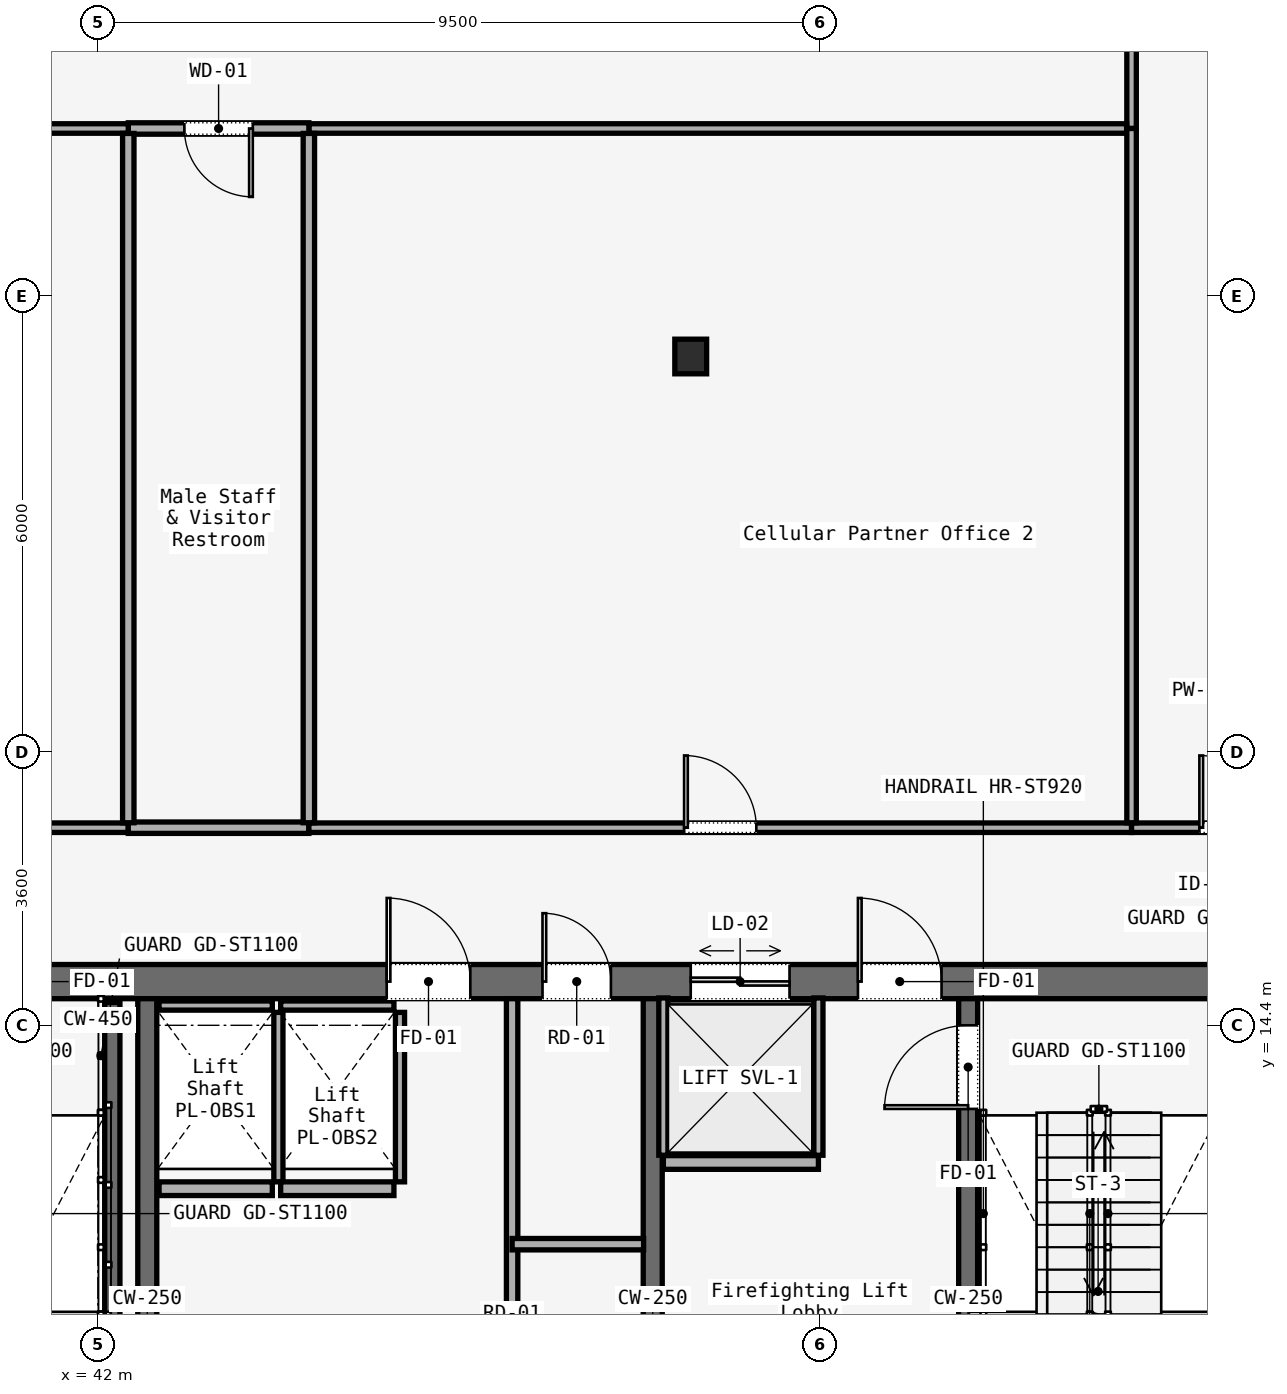
"""IFC4 building model, lengths in metres.
Left out: names, types, materials, properties, quantities, classifications, styles, units other than length and angle.
Written with IfcOpenShell. Run it as: python <this file> out.ifc"""

import sys

from ifc_helpers import new_model, si_unit, direction, frame, frame_2d, origin, origin_2d, place, context, subcontext, project, spatial, rectangle, i_section, extrude, element, fill, save


model = new_model("IFC4")
c1 = context("Model", 3, precision=1e-05, world=origin(), true_north=direction((0.0, 1.0)))
c2 = subcontext(c1, "Body", "Model", "MODEL_VIEW")
j1 = project(units=[si_unit("LENGTHUNIT", "METRE"), si_unit("PLANEANGLEUNIT", "RADIAN")], contexts=[c1])
p1 = place(None, origin())
s1 = spatial("IfcSite", under=j1, at=p1, CompositionType="ELEMENT")
p2 = place(p1, origin())
s2 = spatial("IfcBuilding", under=s1, at=p2, CompositionType="ELEMENT")
p3 = place(p2, frame((0.0, 0.0, 104.4)))
s3 = spatial("IfcBuildingStorey", under=s2, at=p3, CompositionType="ELEMENT", Elevation=104.4)
p4 = place(p3, frame((26.45, 14.975, 0.0), z_axis=(0.0, 0.0, 1.0), x_axis=(1.0, 0.0, 0.0)))
e1 = element("IfcWall", 1, at=p4, inside=s3, PredefinedType="SOLIDWALL", context=c2, shape_type="SweptSolid", body=[
    extrude(rectangle(XDim=31.1, YDim=0.45, at=frame_2d((15.55, 0.0))), origin(), (0.0, 0.0, 1.0), 3.58),
])
p5 = place(p4, frame((1.65, 0.0, 0.0)))
e2 = element("IfcOpeningElement", 2, at=p5, cuts=e1, PredefinedType="OPENING", context=c2, shape_type="SweptSolid", body=[
    extrude(rectangle(XDim=1.1, YDim=2.2, at=frame_2d((0.55, 1.1))), frame((0.0, 0.225, 0.0), z_axis=(0.0, -1.0, 0.0), x_axis=(1.0, 0.0, 0.0)), (0.0, 0.0, 1.0), 0.45),
])
p6 = place(p4, frame((13.65, 0.0, 0.0)))
e3 = element("IfcOpeningElement", 3, at=p6, cuts=e1, PredefinedType="OPENING", context=c2, shape_type="SweptSolid", body=[
    extrude(rectangle(XDim=1.1, YDim=2.2, at=frame_2d((0.55, 1.1))), frame((0.0, 0.225, 0.0), z_axis=(0.0, -1.0, 0.0), x_axis=(1.0, 0.0, 0.0)), (0.0, 0.0, 1.0), 0.45),
])
p7 = place(p4, frame((25.55, 0.0, 0.0)))
e4 = element("IfcOpeningElement", 4, at=p7, cuts=e1, PredefinedType="OPENING", context=c2, shape_type="SweptSolid", body=[
    extrude(rectangle(XDim=1.1, YDim=2.2, at=frame_2d((0.55, 1.1))), frame((0.0, 0.225, 0.0), z_axis=(0.0, -1.0, 0.0), x_axis=(1.0, 0.0, 0.0)), (0.0, 0.0, 1.0), 0.45),
])
p8 = place(p4, frame((10.7, 0.0, 0.0)))
e5 = element("IfcOpeningElement", 5, at=p8, cuts=e1, PredefinedType="OPENING", context=c2, shape_type="SweptSolid", body=[
    extrude(rectangle(XDim=1.4, YDim=2.2, at=frame_2d((0.7, 1.1))), frame((0.0, 0.225, 0.0), z_axis=(0.0, -1.0, 0.0), x_axis=(1.0, 0.0, 0.0)), (0.0, 0.0, 1.0), 0.45),
])
p9 = place(p4, frame((19.35, 0.0, 0.0)))
e6 = element("IfcOpeningElement", 6, at=p9, cuts=e1, PredefinedType="OPENING", context=c2, shape_type="SweptSolid", body=[
    extrude(rectangle(XDim=1.1, YDim=2.2, at=frame_2d((0.55, 1.1))), frame((0.0, 0.225, 0.0), z_axis=(0.0, -1.0, 0.0), x_axis=(1.0, 0.0, 0.0)), (0.0, 0.0, 1.0), 0.45),
])
p10 = place(p4, frame((21.4, 0.0, 0.0)))
e7 = element("IfcOpeningElement", 7, at=p10, cuts=e1, PredefinedType="OPENING", context=c2, shape_type="SweptSolid", body=[
    extrude(rectangle(XDim=0.9, YDim=2.1, at=frame_2d((0.45, 1.05))), frame((0.0, 0.225, 0.0), z_axis=(0.0, -1.0, 0.0), x_axis=(1.0, 0.0, 0.0)), (0.0, 0.0, 1.0), 0.45),
])
p11 = place(p4, frame((23.35, 0.0, 0.0)))
e8 = element("IfcOpeningElement", 8, at=p11, cuts=e1, PredefinedType="OPENING", context=c2, shape_type="SweptSolid", body=[
    extrude(rectangle(XDim=1.3, YDim=2.3, at=frame_2d((0.65, 1.15))), frame((0.0, 0.225, 0.0), z_axis=(0.0, -1.0, 0.0), x_axis=(1.0, 0.0, 0.0)), (0.0, 0.0, 1.0), 0.45),
])
for number, where, z_axis, x_axis in (
    (9, (42.65, 5.85, 0.0), (0.0, 0.0, 1.0), (0.0, 1.0, 0.0)),
    (10, (49.3, 5.85, 0.0), (0.0, 0.0, 1.0), (0.0, 1.0, 0.0)),
):
    element("IfcWall", number, at=place(p3, frame(where, z_axis=z_axis, x_axis=x_axis)), inside=s3, PredefinedType="SOLIDWALL", context=c2, shape_type="SweptSolid", body=[
        extrude(rectangle(XDim=8.9, YDim=0.25, at=frame_2d((4.45, 0.0))), origin(), (0.0, 0.0, 1.0), 3.58),
    ])
p12 = place(p3, frame((53.45, 5.85, 0.0), z_axis=(0.0, 0.0, 1.0), x_axis=(0.0, 1.0, 0.0)))
e11 = element("IfcWall", 11, at=p12, inside=s3, PredefinedType="SOLIDWALL", context=c2, shape_type="SweptSolid", body=[
    extrude(rectangle(XDim=8.9, YDim=0.25, at=frame_2d((4.45, 0.0))), origin(), (0.0, 0.0, 1.0), 3.58),
])
p13 = place(p12, frame((7.45, 0.0, 0.0)))
e12 = element("IfcOpeningElement", 12, at=p13, cuts=e11, PredefinedType="OPENING", context=c2, shape_type="SweptSolid", body=[
    extrude(rectangle(XDim=1.1, YDim=2.2, at=frame_2d((0.55, 1.1))), frame((0.0, 0.125, 0.0), z_axis=(0.0, -1.0, 0.0), x_axis=(1.0, 0.0, 0.0)), (0.0, 0.0, 1.0), 0.25),
])
p14 = place(p3, frame((49.8, 23.2, 0.0), z_axis=(0.0, 0.0, 1.0), x_axis=(1.0, 0.0, 0.0)))
e13 = element("IfcColumn", 13, at=p14, inside=s3, PredefinedType="COLUMN", context=c2, shape_type="SweptSolid", body=[
    extrude(i_section(OverallWidth=0.418, OverallDepth=0.456, WebThickness=0.042, FlangeThickness=0.067, FilletRadius=0.015, at=origin_2d()), origin(), (0.0, 0.0, 1.0), 3.58),
])
p15 = place(p3, frame((42.19, 14.7, 0.0), z_axis=(0.0, 0.0, 1.0), x_axis=(0.0, -1.0, 0.0)))
e14 = element("IfcWall", 14, at=p15, inside=s3, PredefinedType="SOLIDWALL", context=c2, shape_type="SweptSolid", body=[
    extrude(rectangle(XDim=7.65, YDim=0.2, at=frame_2d((3.825, 0.0))), origin(), (0.0, 0.0, 1.0), 3.8),
])
p16 = place(p3, frame((47.45, 5.9, 0.0), z_axis=(0.0, 0.0, 1.0), x_axis=(0.0, 1.0, 0.0)))
e15 = element("IfcWall", 15, at=p16, inside=s3, PredefinedType="PARTITIONING", context=c2, shape_type="SweptSolid", body=[
    extrude(rectangle(XDim=8.85, YDim=0.15, at=frame_2d((4.425, 0.0))), origin(), (0.0, 0.0, 1.0), 2.95),
])
p17 = place(p16, frame((3.2, 0.0, 0.0)))
e16 = element("IfcOpeningElement", 16, at=p17, cuts=e15, PredefinedType="OPENING", context=c2, shape_type="SweptSolid", body=[
    extrude(rectangle(XDim=0.9, YDim=2.1, at=frame_2d((0.45, 1.05))), frame((0.0, 0.075, 0.0), z_axis=(0.0, -1.0, 0.0), x_axis=(1.0, 0.0, 0.0)), (0.0, 0.0, 1.0), 0.15),
])
p18 = place(p3, frame((47.45, 11.52, 0.0), z_axis=(0.0, 0.0, 1.0), x_axis=(1.0, 0.0, 0.0)))
e17 = element("IfcWall", 17, at=p18, inside=s3, PredefinedType="PARTITIONING", context=c2, shape_type="SweptSolid", body=[
    extrude(rectangle(XDim=1.73, YDim=0.15, at=frame_2d((0.865, 0.0))), origin(), (0.0, 0.0, 1.0), 2.95),
])
p19 = place(p3, frame((42.805, 12.25, 0.0), z_axis=(0.0, 0.0, 1.0), x_axis=(1.0, 0.0, 0.0)))
e18 = element("IfcWall", 18, at=p19, inside=s3, PredefinedType="SOLIDWALL", context=c2, shape_type="SweptSolid", body=[
    extrude(rectangle(XDim=1.49, YDim=0.18, at=frame_2d((0.745, 0.0))), origin(), (0.0, 0.0, 1.0), 2.95),
])
p20 = place(p3, frame((42.805, 14.66, 0.0), z_axis=(0.0, 0.0, 1.0), x_axis=(1.0, 0.0, 0.0)))
e19 = element("IfcWall", 19, at=p20, inside=s3, PredefinedType="SOLIDWALL", context=c2, shape_type="SweptSolid", body=[
    extrude(rectangle(XDim=1.49, YDim=0.12, at=frame_2d((0.745, 0.0))), origin(), (0.0, 0.0, 1.0), 2.95),
])
p21 = place(p3, frame((44.375, 12.34, 0.0), z_axis=(0.0, 0.0, 1.0), x_axis=(0.0, 1.0, 0.0)))
e20 = element("IfcWall", 20, at=p21, inside=s3, PredefinedType="SOLIDWALL", context=c2, shape_type="SweptSolid", body=[
    extrude(rectangle(XDim=2.23, YDim=0.12, at=frame_2d((1.115, 0.0))), origin(), (0.0, 0.0, 1.0), 2.95),
])
p22 = place(p3, frame((44.405, 12.25, 0.0), z_axis=(0.0, 0.0, 1.0), x_axis=(1.0, 0.0, 0.0)))
e21 = element("IfcWall", 21, at=p22, inside=s3, PredefinedType="SOLIDWALL", context=c2, shape_type="SweptSolid", body=[
    extrude(rectangle(XDim=1.49, YDim=0.18, at=frame_2d((0.745, 0.0))), origin(), (0.0, 0.0, 1.0), 2.95),
])
p23 = place(p3, frame((44.405, 14.66, 0.0), z_axis=(0.0, 0.0, 1.0), x_axis=(1.0, 0.0, 0.0)))
e22 = element("IfcWall", 22, at=p23, inside=s3, PredefinedType="SOLIDWALL", context=c2, shape_type="SweptSolid", body=[
    extrude(rectangle(XDim=1.49, YDim=0.12, at=frame_2d((0.745, 0.0))), origin(), (0.0, 0.0, 1.0), 2.95),
])
p24 = place(p3, frame((45.975, 12.34, 0.0), z_axis=(0.0, 0.0, 1.0), x_axis=(0.0, 1.0, 0.0)))
e23 = element("IfcWall", 23, at=p24, inside=s3, PredefinedType="SOLIDWALL", context=c2, shape_type="SweptSolid", body=[
    extrude(rectangle(XDim=2.23, YDim=0.12, at=frame_2d((1.115, 0.0))), origin(), (0.0, 0.0, 1.0), 2.95),
])
p25 = place(p3, frame((49.44, 12.595, 0.0), z_axis=(0.0, 0.0, 1.0), x_axis=(1.0, 0.0, 0.0)))
e24 = element("IfcWall", 24, at=p25, inside=s3, PredefinedType="SOLIDWALL", context=c2, shape_type="SweptSolid", body=[
    extrude(rectangle(XDim=2.04, YDim=0.18, at=frame_2d((1.02, 0.0))), origin(), (0.0, 0.0, 1.0), 2.95),
])
for number, where, z_axis, x_axis in (
    (25, (49.44, 12.69, 0.0), (0.0, 0.0, 1.0), (0.0, 1.0, 0.0)),
    (26, (51.48, 12.69, 0.0), (0.0, 0.0, 1.0), (0.0, 1.0, 0.0)),
):
    element("IfcWall", number, at=place(p3, frame(where, z_axis=z_axis, x_axis=x_axis)), inside=s3, PredefinedType="SOLIDWALL", context=c2, shape_type="SweptSolid", body=[
        extrude(rectangle(XDim=2.07, YDim=0.12, at=frame_2d((1.035, 0.0))), origin(), (0.0, 0.0, 1.0), 2.95),
    ])
p26 = place(p3, frame((55.6, 27.935, 0.0), z_axis=(0.0, 0.0, 1.0), x_axis=(0.0, -1.0, 0.0)))
e27 = element("IfcWall", 27, at=p26, inside=s3, PredefinedType="PARTITIONING", context=c2, shape_type="SweptSolid", body=[
    extrude(rectangle(XDim=1.735, YDim=0.125, at=frame_2d((0.868, 0.0))), origin(), (0.0, 0.0, 1.0), 2.95),
])
p27 = place(p3, frame((55.535, 26.2, 0.0), z_axis=(0.0, 0.0, 1.0), x_axis=(-1.0, 0.0, 0.0)))
e28 = element("IfcWall", 28, at=p27, inside=s3, PredefinedType="PARTITIONING", context=c2, shape_type="SweptSolid", body=[
    extrude(rectangle(XDim=10.759, YDim=0.125, at=frame_2d((5.379, 0.0))), origin(), (0.0, 0.0, 1.0), 2.95),
])
p28 = place(p3, frame((44.776, 26.2, 0.0), z_axis=(0.0, 0.0, 1.0), x_axis=(-1.0, 0.0, 0.0)))
e29 = element("IfcWall", 29, at=p28, inside=s3, PredefinedType="PARTITIONING", context=c2, shape_type="SweptSolid", body=[
    extrude(rectangle(XDim=2.376, YDim=0.15, at=frame_2d((1.188, 0.0))), origin(), (0.0, 0.0, 1.0), 2.95),
])
p29 = place(p28, frame((0.738, 0.0, 0.0)))
e30 = element("IfcOpeningElement", 30, at=p29, cuts=e29, PredefinedType="OPENING", context=c2, shape_type="SweptSolid", body=[
    extrude(rectangle(XDim=0.9, YDim=2.15, at=frame_2d((0.45, 1.075))), frame((0.0, 0.075, 0.0), z_axis=(0.0, -1.0, 0.0), x_axis=(1.0, 0.0, 0.0)), (0.0, 0.0, 1.0), 0.15),
])
p30 = place(p3, frame((42.4, 26.2, 0.0), z_axis=(0.0, 0.0, 1.0), x_axis=(-1.0, 0.0, 0.0)))
e31 = element("IfcWall", 31, at=p30, inside=s3, PredefinedType="PARTITIONING", context=c2, shape_type="SweptSolid", body=[
    extrude(rectangle(XDim=10.8, YDim=0.125, at=frame_2d((5.4, 0.0))), origin(), (0.0, 0.0, 1.0), 2.95),
])
p31 = place(p30, frame((4.925, 0.0, 0.0)))
e32 = element("IfcOpeningElement", 32, at=p31, cuts=e31, PredefinedType="OPENING", context=c2, shape_type="SweptSolid", body=[
    extrude(rectangle(XDim=0.95, YDim=2.2, at=frame_2d((0.475, 1.1))), frame((0.0, 0.062, 0.0), z_axis=(0.0, -1.0, 0.0), x_axis=(1.0, 0.0, 0.0)), (0.0, 0.0, 1.0), 0.125),
])
p32 = place(p3, frame((31.665, 17.0, 0.0), z_axis=(0.0, 0.0, 1.0), x_axis=(1.0, 0.0, 0.0)))
e33 = element("IfcWall", 33, at=p32, inside=s3, PredefinedType="PARTITIONING", context=c2, shape_type="SweptSolid", body=[
    extrude(rectangle(XDim=10.735, YDim=0.125, at=frame_2d((5.367, 0.0))), origin(), (0.0, 0.0, 1.0), 2.95),
])
p33 = place(p3, frame((42.4, 17.0, 0.0), z_axis=(0.0, 0.0, 1.0), x_axis=(1.0, 0.0, 0.0)))
e34 = element("IfcWall", 34, at=p33, inside=s3, PredefinedType="PARTITIONING", context=c2, shape_type="SweptSolid", body=[
    extrude(rectangle(XDim=2.376, YDim=0.15, at=frame_2d((1.188, 0.0))), origin(), (0.0, 0.0, 1.0), 2.95),
])
p34 = place(p3, frame((44.776, 17.0, 0.0), z_axis=(0.0, 0.0, 1.0), x_axis=(1.0, 0.0, 0.0)))
e35 = element("IfcWall", 35, at=p34, inside=s3, PredefinedType="PARTITIONING", context=c2, shape_type="SweptSolid", body=[
    extrude(rectangle(XDim=10.824, YDim=0.125, at=frame_2d((5.412, 0.0))), origin(), (0.0, 0.0, 1.0), 2.95),
])
p35 = place(p34, frame((4.937, 0.0, 0.0)))
e36 = element("IfcOpeningElement", 36, at=p35, cuts=e35, PredefinedType="OPENING", context=c2, shape_type="SweptSolid", body=[
    extrude(rectangle(XDim=0.95, YDim=2.2, at=frame_2d((0.475, 1.1))), frame((0.0, 0.062, 0.0), z_axis=(0.0, -1.0, 0.0), x_axis=(1.0, 0.0, 0.0)), (0.0, 0.0, 1.0), 0.125),
])
p36 = place(p3, frame((55.6, 17.0, 0.0), z_axis=(0.0, 0.0, 1.0), x_axis=(1.0, 0.0, 0.0)))
e37 = element("IfcWall", 37, at=p36, inside=s3, PredefinedType="PARTITIONING", context=c2, shape_type="SweptSolid", body=[
    extrude(rectangle(XDim=2.735, YDim=0.125, at=frame_2d((1.367, 0.0))), origin(), (0.0, 0.0, 1.0), 2.95),
])
p37 = place(p36, frame((0.893, 0.0, 0.0)))
e38 = element("IfcOpeningElement", 38, at=p37, cuts=e37, PredefinedType="OPENING", context=c2, shape_type="SweptSolid", body=[
    extrude(rectangle(XDim=0.95, YDim=2.2, at=frame_2d((0.475, 1.1))), frame((0.0, 0.062, 0.0), z_axis=(0.0, -1.0, 0.0), x_axis=(1.0, 0.0, 0.0)), (0.0, 0.0, 1.0), 0.125),
])
for number, where, z_axis, x_axis in (
    (39, (42.4, 26.135, 0.0), (0.0, 0.0, 1.0), (0.0, -1.0, 0.0)),
    (40, (44.776, 26.135, 0.0), (0.0, 0.0, 1.0), (0.0, -1.0, 0.0)),
):
    element("IfcWall", number, at=place(p3, frame(where, z_axis=z_axis, x_axis=x_axis)), inside=s3, PredefinedType="PARTITIONING", context=c2, shape_type="SweptSolid", body=[
        extrude(rectangle(XDim=9.07, YDim=0.15, at=frame_2d((4.535, 0.0))), origin(), (0.0, 0.0, 1.0), 2.95),
    ])
p38 = place(p3, frame((55.6, 26.2, 0.0), z_axis=(0.0, 0.0, 1.0), x_axis=(0.0, -1.0, 0.0)))
e41 = element("IfcWall", 41, at=p38, inside=s3, PredefinedType="PARTITIONING", context=c2, shape_type="SweptSolid", body=[
    extrude(rectangle(XDim=9.135, YDim=0.125, at=frame_2d((4.567, 0.0))), origin(), (0.0, 0.0, 1.0), 2.95),
])
p39 = place(p7, origin())
e42 = element("IfcDoor", 42, at=p39, inside=s3, OperationType="SINGLE_SWING_RIGHT", PredefinedType="DOOR", context=c2, shape_type="SweptSolid", body=[
    extrude(rectangle(XDim=1.1, YDim=2.2, at=frame_2d((0.55, 1.1))), frame((0.0, 0.025, 0.0), z_axis=(0.0, -1.0, 0.0), x_axis=(1.0, 0.0, 0.0)), (0.0, 0.0, 1.0), 0.05),
])
fill(e4, e42)
p40 = place(p9, origin())
e43 = element("IfcDoor", 43, at=p40, inside=s3, OperationType="SINGLE_SWING_LEFT", PredefinedType="DOOR", context=c2, shape_type="SweptSolid", body=[
    extrude(rectangle(XDim=1.1, YDim=2.2, at=frame_2d((0.55, 1.1))), frame((0.0, 0.025, 0.0), z_axis=(0.0, -1.0, 0.0), x_axis=(1.0, 0.0, 0.0)), (0.0, 0.0, 1.0), 0.05),
])
fill(e6, e43)
p41 = place(p10, origin())
e44 = element("IfcDoor", 44, at=p41, inside=s3, OperationType="SINGLE_SWING_LEFT", PredefinedType="DOOR", context=c2, shape_type="SweptSolid", body=[
    extrude(rectangle(XDim=0.9, YDim=2.1, at=frame_2d((0.45, 1.05))), frame((0.0, 0.025, 0.0), z_axis=(0.0, -1.0, 0.0), x_axis=(1.0, 0.0, 0.0)), (0.0, 0.0, 1.0), 0.05),
])
fill(e7, e44)
p42 = place(p13, origin())
e45 = element("IfcDoor", 45, at=p42, inside=s3, OperationType="SINGLE_SWING_LEFT", PredefinedType="DOOR", context=c2, shape_type="SweptSolid", body=[
    extrude(rectangle(XDim=1.1, YDim=2.2, at=frame_2d((0.55, 1.1))), frame((0.0, 0.025, 0.0), z_axis=(0.0, -1.0, 0.0), x_axis=(1.0, 0.0, 0.0)), (0.0, 0.0, 1.0), 0.05),
])
fill(e12, e45)
p43 = place(p11, origin())
e46 = element("IfcDoor", 46, at=p43, inside=s3, OperationType="DOUBLE_DOOR_SLIDING", PredefinedType="DOOR", context=c2, shape_type="SweptSolid", body=[
    extrude(rectangle(XDim=1.3, YDim=2.3, at=frame_2d((0.65, 1.15))), frame((0.0, 0.025, 0.0), z_axis=(0.0, -1.0, 0.0), x_axis=(1.0, 0.0, 0.0)), (0.0, 0.0, 1.0), 0.05),
])
fill(e8, e46)
p44 = place(p29, origin())
e47 = element("IfcDoor", 47, at=p44, inside=s3, OperationType="SINGLE_SWING_LEFT", PredefinedType="DOOR", context=c2, shape_type="SweptSolid", body=[
    extrude(rectangle(XDim=0.9, YDim=2.15, at=frame_2d((0.45, 1.075))), frame((0.0, 0.025, 0.0), z_axis=(0.0, -1.0, 0.0), x_axis=(1.0, 0.0, 0.0)), (0.0, 0.0, 1.0), 0.05),
])
fill(e30, e47)
p45 = place(p35, origin())
e48 = element("IfcDoor", 48, at=p45, inside=s3, OperationType="SINGLE_SWING_RIGHT", PredefinedType="DOOR", context=c2, shape_type="SweptSolid", body=[
    extrude(rectangle(XDim=0.95, YDim=2.2, at=frame_2d((0.475, 1.1))), frame((0.0, 0.025, 0.0), z_axis=(0.0, -1.0, 0.0), x_axis=(1.0, 0.0, 0.0)), (0.0, 0.0, 1.0), 0.05),
])
fill(e36, e48)
p46 = place(p37, origin())
e49 = element("IfcDoor", 49, at=p46, inside=s3, OperationType="SINGLE_SWING_LEFT", PredefinedType="DOOR", context=c2, shape_type="SweptSolid", body=[
    extrude(rectangle(XDim=0.95, YDim=2.2, at=frame_2d((0.475, 1.1))), frame((0.0, 0.025, 0.0), z_axis=(0.0, -1.0, 0.0), x_axis=(1.0, 0.0, 0.0)), (0.0, 0.0, 1.0), 0.05),
])
fill(e38, e49)
save(model, sys.argv[1])
